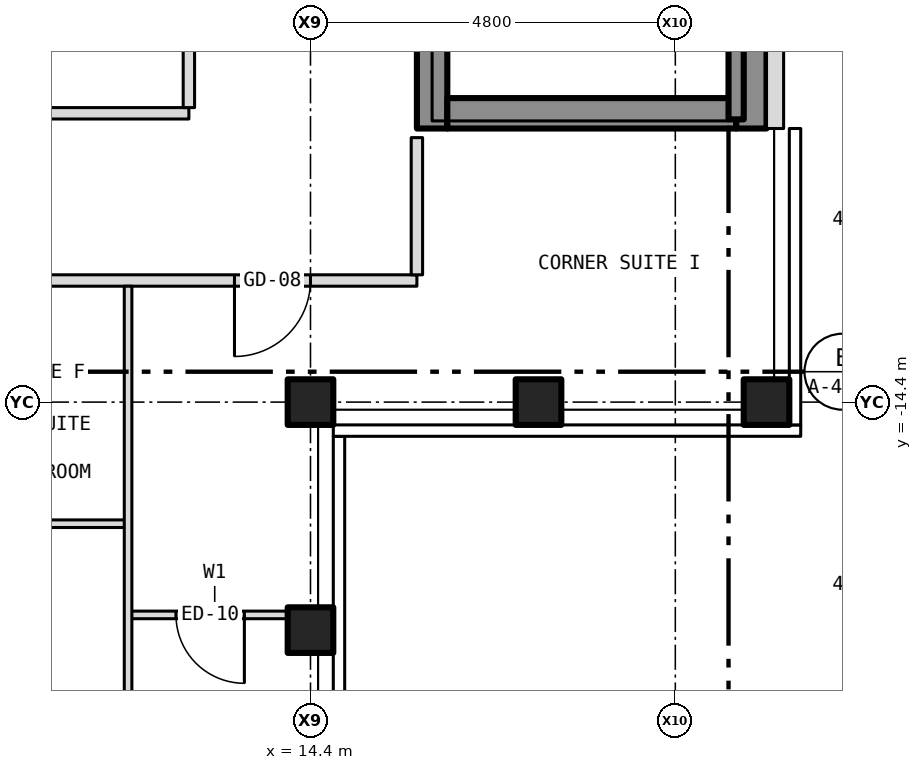
"""IFC4 building model, lengths in metres.
Left out: names, types, materials, properties, quantities, classifications, styles, units other than length and angle.
Written with IfcOpenShell. Run it as: python <this file> out.ifc"""

import sys

from ifc_helpers import new_model, si_unit, direction, frame, frame_2d, origin, origin_2d, place, context, subcontext, project, spatial, rectangle, hollow_rectangle, extrude, element, fill, save


model = new_model("IFC4")
c1 = context("Model", 3, precision=1e-05, world=origin(), true_north=direction((0.0, 1.0)))
c2 = subcontext(c1, "Body", "Model", "MODEL_VIEW")
j1 = project(units=[si_unit("LENGTHUNIT", "METRE"), si_unit("PLANEANGLEUNIT", "RADIAN")], contexts=[c1])
p1 = place(None, origin())
s1 = spatial("IfcSite", under=j1, at=p1, CompositionType="ELEMENT")
p2 = place(p1, origin())
s2 = spatial("IfcBuilding", under=s1, at=p2, CompositionType="ELEMENT")
p3 = place(p2, frame((0.0, 0.0, 241.0)))
s3 = spatial("IfcBuildingStorey", under=s2, at=p3, CompositionType="ELEMENT", Elevation=241.0)
for number, where, z_axis, x_axis in (
    (1, (20.4, -14.4, -0.15), (0.0, 0.0, 1.0), (1.0, 0.0, 0.0)),
    (2, (14.4, -14.4, -0.15), (0.0, 0.0, 1.0), (1.0, 0.0, 0.0)),
    (3, (14.4, -17.4, -0.15), (0.0, 0.0, 1.0), (1.0, 0.0, 0.0)),
    (4, (17.4, -14.4, -0.15), (0.0, 0.0, 1.0), (1.0, 0.0, 0.0)),
):
    element("IfcColumn", number, at=place(p3, frame(where, z_axis=z_axis, x_axis=x_axis)), inside=s3, PredefinedType="COLUMN", context=c2, shape_type="SweptSolid", body=[
        extrude(hollow_rectangle(XDim=0.6, YDim=0.6, WallThickness=0.03, at=origin_2d()), origin(), (0.0, 0.0, 1.0), 3.5),
    ])
p4 = place(p3, frame((16.0, -10.8, 0.0), z_axis=(0.0, 0.0, 1.0), x_axis=(0.0, 1.0, 0.0)))
e5 = element("IfcWall", 5, at=p4, inside=s3, PredefinedType="SHEAR", context=c2, shape_type="SweptSolid", body=[
    extrude(rectangle(XDim=21.6, YDim=0.4, at=frame_2d((10.8, 0.0))), origin(), (0.0, 0.0, 1.0), 3.25),
])
p5 = place(p4, frame((9.4, 0.0, 0.0)))
e6 = element("IfcOpeningElement", 6, at=p5, cuts=e5, PredefinedType="OPENING", context=c2, shape_type="SweptSolid", body=[
    extrude(rectangle(XDim=1.1, YDim=2.1, at=frame_2d((0.55, 1.05))), frame((0.0, 0.212, 0.0), z_axis=(0.0, -1.0, 0.0), x_axis=(1.0, 0.0, 0.0)), (0.0, 0.0, 1.0), 0.424),
])
p6 = place(p4, frame((11.5, 0.0, 0.0)))
e7 = element("IfcOpeningElement", 7, at=p6, cuts=e5, PredefinedType="OPENING", context=c2, shape_type="SweptSolid", body=[
    extrude(rectangle(XDim=1.1, YDim=2.1, at=frame_2d((0.55, 1.05))), frame((0.0, 0.212, 0.0), z_axis=(0.0, -1.0, 0.0), x_axis=(1.0, 0.0, 0.0)), (0.0, 0.0, 1.0), 0.424),
])
p7 = place(p4, frame((13.6, 0.0, 0.0)))
e8 = element("IfcOpeningElement", 8, at=p7, cuts=e5, PredefinedType="OPENING", context=c2, shape_type="SweptSolid", body=[
    extrude(rectangle(XDim=1.1, YDim=2.1, at=frame_2d((0.55, 1.05))), frame((0.0, 0.212, 0.0), z_axis=(0.0, -1.0, 0.0), x_axis=(1.0, 0.0, 0.0)), (0.0, 0.0, 1.0), 0.424),
])
p8 = place(p4, frame((15.7, 0.0, 0.0)))
e9 = element("IfcOpeningElement", 9, at=p8, cuts=e5, PredefinedType="OPENING", context=c2, shape_type="SweptSolid", body=[
    extrude(rectangle(XDim=1.1, YDim=2.1, at=frame_2d((0.55, 1.05))), frame((0.0, 0.212, 0.0), z_axis=(0.0, -1.0, 0.0), x_axis=(1.0, 0.0, 0.0)), (0.0, 0.0, 1.0), 0.424),
])
p9 = place(p4, frame((17.8, 0.0, 0.0)))
e10 = element("IfcOpeningElement", 10, at=p9, cuts=e5, PredefinedType="OPENING", context=c2, shape_type="SweptSolid", body=[
    extrude(rectangle(XDim=1.1, YDim=2.1, at=frame_2d((0.55, 1.05))), frame((0.0, 0.212, 0.0), z_axis=(0.0, -1.0, 0.0), x_axis=(1.0, 0.0, 0.0)), (0.0, 0.0, 1.0), 0.424),
])
p10 = place(p4, frame((5.642, 0.0, 0.0)))
e11 = element("IfcOpeningElement", 11, at=p10, cuts=e5, PredefinedType="OPENING", context=c2, shape_type="SweptSolid", body=[
    extrude(rectangle(XDim=1.1, YDim=2.1, at=frame_2d((0.55, 1.05))), frame((0.0, 0.212, 0.0), z_axis=(0.0, -1.0, 0.0), x_axis=(1.0, 0.0, 0.0)), (0.0, 0.0, 1.0), 0.424),
])
p11 = place(p4, frame((7.5, 0.0, 0.0)))
e12 = element("IfcOpeningElement", 12, at=p11, cuts=e5, PredefinedType="OPENING", context=c2, shape_type="SweptSolid", body=[
    extrude(rectangle(XDim=1.1, YDim=2.1, at=frame_2d((0.55, 1.05))), frame((0.0, 0.212, 0.0), z_axis=(0.0, -1.0, 0.0), x_axis=(1.0, 0.0, 0.0)), (0.0, 0.0, 1.0), 0.424),
])
p12 = place(p4, frame((20.0, 0.0, 0.0)))
e13 = element("IfcOpeningElement", 13, at=p12, cuts=e5, PredefinedType="OPENING", context=c2, shape_type="SweptSolid", body=[
    extrude(rectangle(XDim=0.9, YDim=2.1, at=frame_2d((0.45, 1.05))), frame((0.0, 0.212, 0.0), z_axis=(0.0, -1.0, 0.0), x_axis=(1.0, 0.0, 0.0)), (0.0, 0.0, 1.0), 0.424),
])
p13 = place(p3, frame((20.2, -10.8, 0.0), z_axis=(0.0, 0.0, 1.0), x_axis=(0.0, 1.0, 0.0)))
e14 = element("IfcWall", 14, at=p13, inside=s3, PredefinedType="SHEAR", context=c2, shape_type="SweptSolid", body=[
    extrude(rectangle(XDim=21.6, YDim=0.4, at=frame_2d((10.8, 0.0))), origin(), (0.0, 0.0, 1.0), 3.25),
])
p14 = place(p3, frame((16.2, -10.6, 0.0), z_axis=(0.0, 0.0, 1.0), x_axis=(1.0, 0.0, 0.0)))
e15 = element("IfcWall", 15, at=p14, inside=s3, PredefinedType="SHEAR", context=c2, shape_type="SweptSolid", body=[
    extrude(rectangle(XDim=3.8, YDim=0.4, at=frame_2d((1.9, 0.0))), origin(), (0.0, 0.0, 1.0), 3.25),
])
p15 = place(p3, frame((20.512, -10.8, 0.0), z_axis=(0.0, 0.0, 1.0), x_axis=(0.0, 1.0, 0.0)))
e16 = element("IfcWall", 16, at=p15, inside=s3, PredefinedType="SOLIDWALL", context=c2, shape_type="SweptSolid", body=[
    extrude(rectangle(XDim=21.6, YDim=0.225, at=frame_2d((10.8, 0.0))), origin(), (0.0, 0.0, 1.0), 3.5),
])
p16 = place(p15, frame((2.95, 0.0, 1.0)))
e17 = element("IfcOpeningElement", 17, at=p16, cuts=e16, PredefinedType="OPENING", context=c2, shape_type="SweptSolid", body=[
    extrude(rectangle(XDim=0.6, YDim=1.5, at=frame_2d((0.3, 0.75))), frame((0.0, 0.125, 0.0), z_axis=(0.0, -1.0, 0.0), x_axis=(1.0, 0.0, 0.0)), (0.0, 0.0, 1.0), 0.249),
])
p17 = place(p3, frame((12.0, -17.2, 0.0), z_axis=(0.0, 0.0, 1.0), x_axis=(1.0, 0.0, 0.0)))
e18 = element("IfcWall", 18, at=p17, inside=s3, PredefinedType="PARTITIONING", context=c2, shape_type="SweptSolid", body=[
    extrude(rectangle(XDim=2.28, YDim=0.1, at=frame_2d((1.14, 0.0))), origin(), (0.0, 0.0, 1.0), 3.35),
])
p18 = place(p17, frame((0.63, 0.0, 0.0)))
e19 = element("IfcOpeningElement", 19, at=p18, cuts=e18, PredefinedType="OPENING", context=c2, shape_type="SweptSolid", body=[
    extrude(rectangle(XDim=0.9, YDim=2.1, at=frame_2d((0.45, 1.05))), frame((0.0, 0.062, 0.0), z_axis=(0.0, -1.0, 0.0), x_axis=(1.0, 0.0, 0.0)), (0.0, 0.0, 1.0), 0.124),
])
p19 = place(p3, frame((9.8, -16.0, 0.0), z_axis=(0.0, 0.0, 1.0), x_axis=(1.0, 0.0, 0.0)))
e20 = element("IfcWall", 20, at=p19, inside=s3, PredefinedType="PARTITIONING", context=c2, shape_type="SweptSolid", body=[
    extrude(rectangle(XDim=2.2, YDim=0.1, at=frame_2d((1.1, 0.0))), origin(), (0.0, 0.0, 1.0), 3.35),
])
p20 = place(p3, frame((-15.8, -12.8, 0.0), z_axis=(0.0, 0.0, 1.0), x_axis=(1.0, 0.0, 0.0)))
e21 = element("IfcWall", 21, at=p20, inside=s3, PredefinedType="PARTITIONING", context=c2, shape_type="SweptSolid", body=[
    extrude(rectangle(XDim=31.6, YDim=0.15, at=frame_2d((15.8, 0.0))), origin(), (0.0, 0.0, 1.0), 3.35),
])
p21 = place(p20, frame((4.6, 0.0, 0.0)))
e22 = element("IfcOpeningElement", 22, at=p21, cuts=e21, PredefinedType="OPENING", context=c2, shape_type="SweptSolid", body=[
    extrude(rectangle(XDim=1.0, YDim=2.1, at=frame_2d((0.5, 1.05))), frame((0.0, 0.087, 0.0), z_axis=(0.0, -1.0, 0.0), x_axis=(1.0, 0.0, 0.0)), (0.0, 0.0, 1.0), 0.174),
])
p22 = place(p20, frame((12.8, 0.0, 0.0)))
e23 = element("IfcOpeningElement", 23, at=p22, cuts=e21, PredefinedType="OPENING", context=c2, shape_type="SweptSolid", body=[
    extrude(rectangle(XDim=1.0, YDim=2.1, at=frame_2d((0.5, 1.05))), frame((0.0, 0.087, 0.0), z_axis=(0.0, -1.0, 0.0), x_axis=(1.0, 0.0, 0.0)), (0.0, 0.0, 1.0), 0.174),
])
p23 = place(p20, frame((18.0, 0.0, 0.0)))
e24 = element("IfcOpeningElement", 24, at=p23, cuts=e21, PredefinedType="OPENING", context=c2, shape_type="SweptSolid", body=[
    extrude(rectangle(XDim=1.0, YDim=2.1, at=frame_2d((0.5, 1.05))), frame((0.0, 0.087, 0.0), z_axis=(0.0, -1.0, 0.0), x_axis=(1.0, 0.0, 0.0)), (0.0, 0.0, 1.0), 0.174),
])
p24 = place(p20, frame((1.4, 0.0, 0.0)))
e25 = element("IfcOpeningElement", 25, at=p24, cuts=e21, PredefinedType="OPENING", context=c2, shape_type="SweptSolid", body=[
    extrude(rectangle(XDim=1.0, YDim=2.1, at=frame_2d((0.5, 1.05))), frame((0.0, 0.087, 0.0), z_axis=(0.0, -1.0, 0.0), x_axis=(1.0, 0.0, 0.0)), (0.0, 0.0, 1.0), 0.174),
])
p25 = place(p20, frame((29.2, 0.0, 0.0)))
e26 = element("IfcOpeningElement", 26, at=p25, cuts=e21, PredefinedType="OPENING", context=c2, shape_type="SweptSolid", body=[
    extrude(rectangle(XDim=1.0, YDim=2.1, at=frame_2d((0.5, 1.05))), frame((0.0, 0.087, 0.0), z_axis=(0.0, -1.0, 0.0), x_axis=(1.0, 0.0, 0.0)), (0.0, 0.0, 1.0), 0.174),
])
p26 = place(p3, frame((9.7, -10.6, 0.0), z_axis=(0.0, 0.0, 1.0), x_axis=(1.0, 0.0, 0.0)))
e27 = element("IfcWall", 27, at=p26, inside=s3, PredefinedType="PARTITIONING", context=c2, shape_type="SweptSolid", body=[
    extrude(rectangle(XDim=3.1, YDim=0.15, at=frame_2d((1.55, 0.0))), origin(), (0.0, 0.0, 1.0), 3.35),
])
p27 = place(p3, frame((12.0, -20.73, 0.0), z_axis=(0.0, 0.0, 1.0), x_axis=(0.0, 1.0, 0.0)))
e28 = element("IfcWall", 28, at=p27, inside=s3, PredefinedType="PARTITIONING", context=c2, shape_type="SweptSolid", body=[
    extrude(rectangle(XDim=7.855, YDim=0.1, at=frame_2d((3.927, 0.0))), origin(), (0.0, 0.0, 1.0), 3.35),
])
p28 = place(p3, frame((12.8, -10.525, 0.0), z_axis=(0.0, 0.0, 1.0), x_axis=(0.0, 1.0, 0.0)))
e29 = element("IfcWall", 29, at=p28, inside=s3, PredefinedType="PARTITIONING", context=c2, shape_type="SweptSolid", body=[
    extrude(rectangle(XDim=8.525, YDim=0.15, at=frame_2d((4.262, 0.0))), origin(), (0.0, 0.0, 1.0), 3.35),
])
p29 = place(p3, frame((15.8, -12.725, 0.0), z_axis=(0.0, 0.0, 1.0), x_axis=(0.0, 1.0, 0.0)))
e30 = element("IfcWall", 30, at=p29, inside=s3, PredefinedType="PARTITIONING", context=c2, shape_type="SweptSolid", body=[
    extrude(rectangle(XDim=1.805, YDim=0.15, at=frame_2d((0.903, 0.0))), origin(), (0.0, 0.0, 1.0), 3.35),
])
p30 = place(p3, frame((20.0, -10.68, 0.0), z_axis=(0.0, 0.0, 1.0), x_axis=(0.0, 1.0, 0.0)))
e31 = element("IfcWall", 31, at=p30, inside=s3, PredefinedType="SHEAR", context=c2, shape_type="SweptSolid", body=[
    extrude(rectangle(XDim=6.98, YDim=0.2, at=frame_2d((3.49, 0.0))), origin(), (0.0, 0.0, 1.0), 3.25),
])
p31 = place(p18, origin())
e32 = element("IfcDoor", 32, at=p31, inside=s3, OperationType="SINGLE_SWING_RIGHT", PredefinedType="DOOR", context=c2, shape_type="SweptSolid", body=[
    extrude(rectangle(XDim=0.9, YDim=2.1, at=frame_2d((0.45, 1.05))), frame((0.0, 0.025, 0.0), z_axis=(0.0, -1.0, 0.0), x_axis=(1.0, 0.0, 0.0)), (0.0, 0.0, 1.0), 0.05),
])
fill(e19, e32)
p32 = place(p25, origin())
e33 = element("IfcDoor", 33, at=p32, inside=s3, OperationType="SINGLE_SWING_LEFT", PredefinedType="DOOR", context=c2, shape_type="SweptSolid", body=[
    extrude(rectangle(XDim=1.0, YDim=2.1, at=frame_2d((0.5, 1.05))), frame((0.0, 0.025, 0.0), z_axis=(0.0, -1.0, 0.0), x_axis=(1.0, 0.0, 0.0)), (0.0, 0.0, 1.0), 0.05),
])
fill(e26, e33)
save(model, sys.argv[1])
